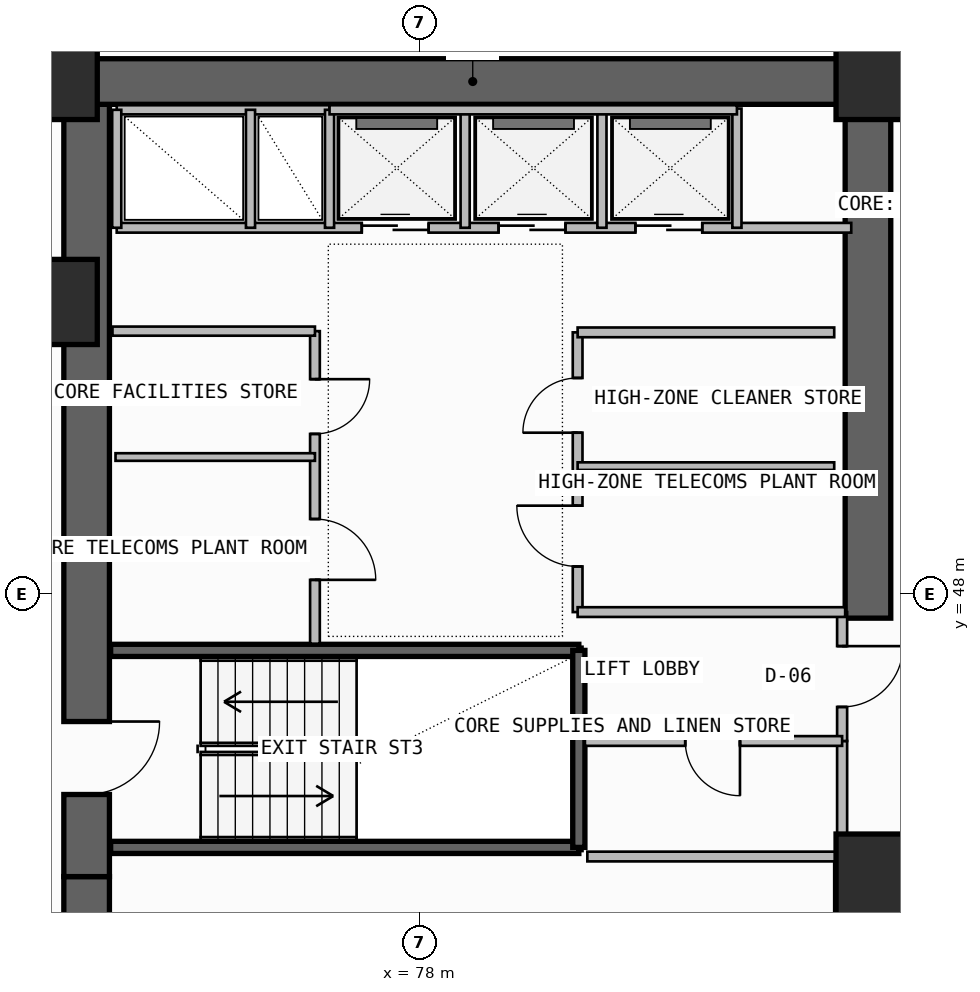
"""IFC4 building model, lengths in metres.
Left out: names, types, materials, properties, quantities, classifications, styles, units other than length and angle.
Written with IfcOpenShell. Run it as: python <this file> out.ifc"""

import sys

from ifc_helpers import new_model, si_unit, direction, frame, frame_2d, origin, origin_2d, place, context, subcontext, project, spatial, rectangle, extrude, element, fill, save


model = new_model("IFC4")
c1 = context("Model", 3, precision=1e-05, world=origin(), true_north=direction((0.0, 1.0)))
c2 = subcontext(c1, "Body", "Model", "MODEL_VIEW")
j1 = project(units=[si_unit("LENGTHUNIT", "METRE"), si_unit("PLANEANGLEUNIT", "RADIAN")], contexts=[c1])
p1 = place(None, origin())
s1 = spatial("IfcSite", under=j1, at=p1, CompositionType="ELEMENT")
p2 = place(p1, origin())
s2 = spatial("IfcBuilding", under=s1, at=p2, CompositionType="ELEMENT")
p3 = place(p2, frame((0.0, 0.0, 222.02)))
s3 = spatial("IfcBuildingStorey", under=s2, at=p3, CompositionType="ELEMENT", Elevation=222.02)
p4 = place(p3, frame((72.525, 35.5, -0.26), z_axis=(0.0, 0.0, 1.0), x_axis=(0.0, 1.0, 0.0)))
e1 = element("IfcWall", 1, at=p4, inside=s3, PredefinedType="SHEAR", context=c2, shape_type="SweptSolid", body=[
    extrude(rectangle(XDim=7.85, YDim=0.75, at=frame_2d((3.925, 0.0))), origin(), (0.0, 0.0, 1.0), 3.52),
])
p5 = place(p4, frame((1.45, 0.0, 0.26)))
e2 = element("IfcOpeningElement", 2, at=p5, cuts=e1, PredefinedType="OPENING", context=c2, shape_type="SweptSolid", body=[
    extrude(rectangle(XDim=1.2, YDim=2.2, at=frame_2d((0.6, 1.1))), frame((0.0, 0.385, 0.0), z_axis=(0.0, -1.0, 0.0), x_axis=(1.0, 0.0, 0.0)), (0.0, 0.0, 1.0), 0.77),
])
p6 = place(p3, frame((72.525, 43.35, -0.26), z_axis=(0.0, 0.0, 1.0), x_axis=(0.0, 1.0, 0.0)))
e3 = element("IfcWall", 3, at=p6, inside=s3, PredefinedType="SHEAR", context=c2, shape_type="SweptSolid", body=[
    extrude(rectangle(XDim=12.7, YDim=0.75, at=frame_2d((6.35, 0.0))), origin(), (0.0, 0.0, 1.0), 3.52),
])
p7 = place(p6, frame((1.35, 0.0, 0.26)))
e4 = element("IfcOpeningElement", 4, at=p7, cuts=e3, PredefinedType="OPENING", context=c2, shape_type="SweptSolid", body=[
    extrude(rectangle(XDim=1.2, YDim=2.2, at=frame_2d((0.6, 1.1))), frame((0.0, 0.385, 0.0), z_axis=(0.0, -1.0, 0.0), x_axis=(1.0, 0.0, 0.0)), (0.0, 0.0, 1.0), 0.77),
])
p8 = place(p3, frame((72.0, 56.425, -0.26), z_axis=(0.0, 0.0, 1.0), x_axis=(1.0, 0.0, 0.0)))
e5 = element("IfcWall", 5, at=p8, inside=s3, PredefinedType="SHEAR", context=c2, shape_type="SweptSolid", body=[
    extrude(rectangle(XDim=13.75, YDim=0.75, at=frame_2d((6.875, 0.0))), origin(), (0.0, 0.0, 1.0), 3.52),
])
p9 = place(p3, frame((85.375, 47.6, -0.26), z_axis=(0.0, 0.0, 1.0), x_axis=(0.0, 1.0, 0.0)))
e6 = element("IfcWall", 6, at=p9, inside=s3, PredefinedType="SHEAR", context=c2, shape_type="SweptSolid", body=[
    extrude(rectangle(XDim=8.45, YDim=0.75, at=frame_2d((4.225, 0.0))), origin(), (0.0, 0.0, 1.0), 3.52),
])
for number, where, z_axis, x_axis in (
    (7, (85.55, 43.35, 0.0), (0.0, 0.0, 1.0), (1.0, 0.0, 0.0)),
    (8, (72.0, 52.8, 0.0), (0.0, 0.0, 1.0), (1.0, 0.0, 0.0)),
    (9, (72.0, 56.5, 0.0), (0.0, 0.0, 1.0), (1.0, 0.0, 0.0)),
    (10, (85.55, 56.5, 0.0), (0.0, 0.0, 1.0), (1.0, 0.0, 0.0)),
):
    element("IfcColumn", number, at=place(p3, frame(where, z_axis=z_axis, x_axis=x_axis)), inside=s3, PredefinedType="COLUMN", context=c2, shape_type="SweptSolid", body=[
        extrude(rectangle(XDim=1.4, YDim=1.4, at=origin_2d()), origin(), (0.0, 0.0, 1.0), 3.52),
    ])
p10 = place(p3, frame((116.396, 56.722, 0.0), z_axis=(0.0, 0.0, 1.0), x_axis=(-0.977936620644, 0.208901809478, 0.0)))
e11 = element("IfcWall", 11, at=p10, inside=s3, PredefinedType="PARAPET", context=c2, shape_type="SweptSolid", body=[
    extrude(rectangle(XDim=31.685, YDim=0.2, at=frame_2d((15.843, 0.0))), origin(), (0.0, 0.0, 1.0), 1.15),
])
p11 = place(p3, frame((84.92, 38.85, 0.0), z_axis=(0.0, 0.0, 1.0), x_axis=(0.0, 1.0, 0.0)))
e12 = element("IfcWall", 12, at=p11, inside=s3, PredefinedType="SOLIDWALL", context=c2, shape_type="SweptSolid", body=[
    extrude(rectangle(XDim=4.83, YDim=0.2, at=frame_2d((2.415, 0.0))), origin(), (0.0, 0.0, 1.0), 3.26),
])
p12 = place(p11, frame((1.25, 0.0, 0.0)))
e13 = element("IfcOpeningElement", 13, at=p12, cuts=e12, PredefinedType="OPENING", context=c2, shape_type="SweptSolid", body=[
    extrude(rectangle(XDim=1.1, YDim=2.2, at=frame_2d((0.55, 1.1))), frame((0.0, 0.11, 0.0), z_axis=(0.0, -1.0, 0.0), x_axis=(1.0, 0.0, 0.0)), (0.0, 0.0, 1.0), 0.22),
])
for number, where, z_axis, x_axis in (
    (14, (72.92, 43.83, -0.26), (0.0, 0.0, 1.0), (1.0, 0.0, 0.0)),
    (15, (72.92, 47.07, -0.26), (0.0, 0.0, 1.0), (1.0, 0.0, 0.0)),
):
    element("IfcWall", number, at=place(p3, frame(where, z_axis=z_axis, x_axis=x_axis)), inside=s3, PredefinedType="SOLIDWALL", context=c2, shape_type="SweptSolid", body=[
        extrude(rectangle(XDim=7.7, YDim=0.2, at=frame_2d((3.85, 0.0))), origin(), (0.0, 0.0, 1.0), 3.52),
    ])
p13 = place(p3, frame((80.62, 43.83, -0.26), z_axis=(0.0, 0.0, 1.0), x_axis=(0.0, 1.0, 0.0)))
e16 = element("IfcWall", 16, at=p13, inside=s3, PredefinedType="SOLIDWALL", context=c2, shape_type="SweptSolid", body=[
    extrude(rectangle(XDim=3.24, YDim=0.2, at=frame_2d((1.62, 0.0))), origin(), (0.0, 0.0, 1.0), 3.52),
])
p14 = place(p3, frame((84.95, 43.68, 0.0), z_axis=(0.0, 0.0, 1.0), x_axis=(0.0, 1.0, 0.0)))
e17 = element("IfcWall", 17, at=p14, inside=s3, PredefinedType="PLUMBINGWALL", context=c2, shape_type="SweptSolid", body=[
    extrude(rectangle(XDim=1.9, YDim=0.165, at=frame_2d((0.95, 0.0))), origin(), (0.0, 0.0, 1.0), 3.26),
])
p15 = place(p3, frame((84.95, 45.58, 0.0), z_axis=(0.0, 0.0, 1.0), x_axis=(0.0, 1.0, 0.0)))
e18 = element("IfcWall", 18, at=p15, inside=s3, PredefinedType="PARTITIONING", context=c2, shape_type="SweptSolid", body=[
    extrude(rectangle(XDim=2.12, YDim=0.165, at=frame_2d((1.06, 0.0))), origin(), (0.0, 0.0, 1.0), 3.26),
])
p16 = place(p15, frame((0.56, 0.0, 0.0)))
e19 = element("IfcOpeningElement", 19, at=p16, cuts=e18, PredefinedType="OPENING", context=c2, shape_type="SweptSolid", body=[
    extrude(rectangle(XDim=1.0, YDim=2.2, at=frame_2d((0.5, 1.1))), frame((0.0, 0.093, 0.0), z_axis=(0.0, -1.0, 0.0), x_axis=(1.0, 0.0, 0.0)), (0.0, 0.0, 1.0), 0.185),
])
p17 = place(p3, frame((80.72, 45.58, 0.0), z_axis=(0.0, 0.0, 1.0), x_axis=(1.0, 0.0, 0.0)))
e20 = element("IfcWall", 20, at=p17, inside=s3, PredefinedType="PLUMBINGWALL", context=c2, shape_type="SweptSolid", body=[
    extrude(rectangle(XDim=4.23, YDim=0.16, at=frame_2d((2.115, 0.0))), origin(), (0.0, 0.0, 1.0), 3.26),
])
p18 = place(p17, frame((1.65, 0.0, 0.0)))
e21 = element("IfcOpeningElement", 21, at=p18, cuts=e20, PredefinedType="OPENING", context=c2, shape_type="SweptSolid", body=[
    extrude(rectangle(XDim=0.9, YDim=2.1, at=frame_2d((0.45, 1.05))), frame((0.0, 0.09, 0.0), z_axis=(0.0, -1.0, 0.0), x_axis=(1.0, 0.0, 0.0)), (0.0, 0.0, 1.0), 0.18),
])
p19 = place(p3, frame((80.76, 43.68, 0.0), z_axis=(0.0, 0.0, 1.0), x_axis=(1.0, 0.0, 0.0)))
e22 = element("IfcWall", 22, at=p19, inside=s3, PredefinedType="PLUMBINGWALL", context=c2, shape_type="SweptSolid", body=[
    extrude(rectangle(XDim=4.19, YDim=0.16, at=frame_2d((2.095, 0.0))), origin(), (0.0, 0.0, 1.0), 3.26),
])
p20 = place(p3, frame((76.28, 47.18, 0.0), z_axis=(0.0, 0.0, 1.0), x_axis=(0.0, 1.0, 0.0)))
e23 = element("IfcWall", 23, at=p20, inside=s3, PredefinedType="SOLIDWALL", context=c2, shape_type="SweptSolid", body=[
    extrude(rectangle(XDim=5.14, YDim=0.16, at=frame_2d((2.57, 0.0))), origin(), (0.0, 0.0, 1.0), 3.26),
])
p21 = place(p20, frame((1.05, 0.0, 0.0)))
e24 = element("IfcOpeningElement", 24, at=p21, cuts=e23, PredefinedType="OPENING", context=c2, shape_type="SweptSolid", body=[
    extrude(rectangle(XDim=1.0, YDim=2.2, at=frame_2d((0.5, 1.1))), frame((0.0, 0.09, 0.0), z_axis=(0.0, -1.0, 0.0), x_axis=(1.0, 0.0, 0.0)), (0.0, 0.0, 1.0), 0.18),
])
p22 = place(p20, frame((3.45, 0.0, 0.0)))
e25 = element("IfcOpeningElement", 25, at=p22, cuts=e23, PredefinedType="OPENING", context=c2, shape_type="SweptSolid", body=[
    extrude(rectangle(XDim=0.9, YDim=2.1, at=frame_2d((0.45, 1.05))), frame((0.0, 0.09, 0.0), z_axis=(0.0, -1.0, 0.0), x_axis=(1.0, 0.0, 0.0)), (0.0, 0.0, 1.0), 0.18),
])
p23 = place(p3, frame((72.95, 52.32, 0.0), z_axis=(0.0, 0.0, 1.0), x_axis=(1.0, 0.0, 0.0)))
e26 = element("IfcWall", 26, at=p23, inside=s3, PredefinedType="SOLIDWALL", context=c2, shape_type="SweptSolid", body=[
    extrude(rectangle(XDim=3.33, YDim=0.15, at=frame_2d((1.665, 0.0))), origin(), (0.0, 0.0, 1.0), 3.26),
])
p24 = place(p3, frame((73.0, 50.25, 0.0), z_axis=(0.0, 0.0, 1.0), x_axis=(1.0, 0.0, 0.0)))
e27 = element("IfcWall", 27, at=p24, inside=s3, PredefinedType="PARTITIONING", context=c2, shape_type="SweptSolid", body=[
    extrude(rectangle(XDim=3.28, YDim=0.125, at=frame_2d((1.64, 0.0))), origin(), (0.0, 0.0, 1.0), 3.26),
])
p25 = place(p3, frame((80.6, 47.7, 0.0), z_axis=(0.0, 0.0, 1.0), x_axis=(0.0, 1.0, 0.0)))
e28 = element("IfcWall", 28, at=p25, inside=s3, PredefinedType="SOLIDWALL", context=c2, shape_type="SweptSolid", body=[
    extrude(rectangle(XDim=4.6, YDim=0.16, at=frame_2d((2.3, 0.0))), origin(), (0.0, 0.0, 1.0), 3.26),
])
p26 = place(p25, frame((0.75, 0.0, 0.0)))
e29 = element("IfcOpeningElement", 29, at=p26, cuts=e28, PredefinedType="OPENING", context=c2, shape_type="SweptSolid", body=[
    extrude(rectangle(XDim=1.0, YDim=2.2, at=frame_2d((0.5, 1.1))), frame((0.0, 0.09, 0.0), z_axis=(0.0, -1.0, 0.0), x_axis=(1.0, 0.0, 0.0)), (0.0, 0.0, 1.0), 0.18),
])
p27 = place(p25, frame((2.95, 0.0, 0.0)))
e30 = element("IfcOpeningElement", 30, at=p27, cuts=e28, PredefinedType="OPENING", context=c2, shape_type="SweptSolid", body=[
    extrude(rectangle(XDim=0.9, YDim=2.1, at=frame_2d((0.45, 1.05))), frame((0.0, 0.09, 0.0), z_axis=(0.0, -1.0, 0.0), x_axis=(1.0, 0.0, 0.0)), (0.0, 0.0, 1.0), 0.18),
])
p28 = place(p3, frame((80.6, 47.7, 0.0), z_axis=(0.0, 0.0, 1.0), x_axis=(1.0, 0.0, 0.0)))
e31 = element("IfcWall", 31, at=p28, inside=s3, PredefinedType="SOLIDWALL", context=c2, shape_type="SweptSolid", body=[
    extrude(rectangle(XDim=4.4, YDim=0.16, at=frame_2d((2.2, 0.0))), origin(), (0.0, 0.0, 1.0), 3.26),
])
p29 = place(p3, frame((80.6, 52.3, 0.0), z_axis=(0.0, 0.0, 1.0), x_axis=(1.0, 0.0, 0.0)))
e32 = element("IfcWall", 32, at=p29, inside=s3, PredefinedType="SOLIDWALL", context=c2, shape_type="SweptSolid", body=[
    extrude(rectangle(XDim=4.22, YDim=0.16, at=frame_2d((2.11, 0.0))), origin(), (0.0, 0.0, 1.0), 3.26),
])
p30 = place(p3, frame((80.6, 50.1, 0.0), z_axis=(0.0, 0.0, 1.0), x_axis=(1.0, 0.0, 0.0)))
e33 = element("IfcWall", 33, at=p30, inside=s3, PredefinedType="PARTITIONING", context=c2, shape_type="SweptSolid", body=[
    extrude(rectangle(XDim=4.22, YDim=0.125, at=frame_2d((2.11, 0.0))), origin(), (0.0, 0.0, 1.0), 3.26),
])
p31 = place(p3, frame((73.02, 54.02, 0.0), z_axis=(0.0, 0.0, 1.0), x_axis=(1.0, 0.0, 0.0)))
e34 = element("IfcWall", 34, at=p31, inside=s3, PredefinedType="SOLIDWALL", context=c2, shape_type="SweptSolid", body=[
    extrude(rectangle(XDim=12.08, YDim=0.16, at=frame_2d((6.04, 0.0))), origin(), (0.0, 0.0, 1.0), 3.26),
])
p32 = place(p31, frame((4.03, 0.0, 0.0)))
e35 = element("IfcOpeningElement", 35, at=p32, cuts=e34, PredefinedType="OPENING", context=c2, shape_type="SweptSolid", body=[
    extrude(rectangle(XDim=1.1, YDim=2.25, at=frame_2d((0.55, 1.125))), frame((0.0, 0.09, 0.0), z_axis=(0.0, -1.0, 0.0), x_axis=(1.0, 0.0, 0.0)), (0.0, 0.0, 1.0), 0.18),
])
p33 = place(p31, frame((6.28, 0.0, 0.0)))
e36 = element("IfcOpeningElement", 36, at=p33, cuts=e34, PredefinedType="OPENING", context=c2, shape_type="SweptSolid", body=[
    extrude(rectangle(XDim=1.1, YDim=2.25, at=frame_2d((0.55, 1.125))), frame((0.0, 0.09, 0.0), z_axis=(0.0, -1.0, 0.0), x_axis=(1.0, 0.0, 0.0)), (0.0, 0.0, 1.0), 0.18),
])
p34 = place(p31, frame((8.53, 0.0, 0.0)))
e37 = element("IfcOpeningElement", 37, at=p34, cuts=e34, PredefinedType="OPENING", context=c2, shape_type="SweptSolid", body=[
    extrude(rectangle(XDim=1.1, YDim=2.25, at=frame_2d((0.55, 1.125))), frame((0.0, 0.09, 0.0), z_axis=(0.0, -1.0, 0.0), x_axis=(1.0, 0.0, 0.0)), (0.0, 0.0, 1.0), 0.18),
])
p35 = place(p3, frame((73.02, 55.96, 0.0), z_axis=(0.0, 0.0, 1.0), x_axis=(1.0, 0.0, 0.0)))
e38 = element("IfcWall", 38, at=p35, inside=s3, PredefinedType="SOLIDWALL", context=c2, shape_type="SweptSolid", body=[
    extrude(rectangle(XDim=3.5, YDim=0.15, at=frame_2d((1.75, 0.0))), origin(), (0.0, 0.0, 1.0), 3.26),
])
p36 = place(p3, frame((73.02, 54.02, 0.0), z_axis=(0.0, 0.0, 1.0), x_axis=(0.0, 1.0, 0.0)))
e39 = element("IfcWall", 39, at=p36, inside=s3, PredefinedType="PLUMBINGWALL", context=c2, shape_type="SweptSolid", body=[
    extrude(rectangle(XDim=1.94, YDim=0.15, at=frame_2d((0.97, 0.0))), origin(), (0.0, 0.0, 1.0), 3.26),
])
p37 = place(p3, frame((76.52, 54.02, 0.0), z_axis=(0.0, 0.0, 1.0), x_axis=(0.0, 1.0, 0.0)))
e40 = element("IfcWall", 40, at=p37, inside=s3, PredefinedType="SOLIDWALL", context=c2, shape_type="SweptSolid", body=[
    extrude(rectangle(XDim=1.94, YDim=0.15, at=frame_2d((0.97, 0.0))), origin(), (0.0, 0.0, 1.0), 3.26),
])
p38 = place(p3, frame((75.22, 54.02, 0.0), z_axis=(0.0, 0.0, 1.0), x_axis=(0.0, 1.0, 0.0)))
e41 = element("IfcWall", 41, at=p38, inside=s3, PredefinedType="PLUMBINGWALL", context=c2, shape_type="SweptSolid", body=[
    extrude(rectangle(XDim=1.94, YDim=0.15, at=frame_2d((0.97, 0.0))), origin(), (0.0, 0.0, 1.0), 3.26),
])
for number, where, z_axis, x_axis in (
    (42, (78.75, 54.02, 0.0), (0.0, 0.0, 1.0), (0.0, 1.0, 0.0)),
    (43, (81.0, 54.02, 0.0), (0.0, 0.0, 1.0), (0.0, 1.0, 0.0)),
):
    element("IfcWall", number, at=place(p3, frame(where, z_axis=z_axis, x_axis=x_axis)), inside=s3, PredefinedType="PLUMBINGWALL", context=c2, shape_type="SweptSolid", body=[
        extrude(rectangle(XDim=1.96, YDim=0.15, at=frame_2d((0.98, 0.0))), origin(), (0.0, 0.0, 1.0), 3.26),
    ])
p39 = place(p3, frame((83.22, 54.02, 0.0), z_axis=(0.0, 0.0, 1.0), x_axis=(0.0, 1.0, 0.0)))
e44 = element("IfcWall", 44, at=p39, inside=s3, PredefinedType="SOLIDWALL", context=c2, shape_type="SweptSolid", body=[
    extrude(rectangle(XDim=1.96, YDim=0.15, at=frame_2d((0.98, 0.0))), origin(), (0.0, 0.0, 1.0), 3.26),
])
p40 = place(p3, frame((76.52, 55.96, 0.0), z_axis=(0.0, 0.0, 1.0), x_axis=(1.0, 0.0, 0.0)))
e45 = element("IfcWall", 45, at=p40, inside=s3, PredefinedType="SOLIDWALL", context=c2, shape_type="SweptSolid", body=[
    extrude(rectangle(XDim=6.7, YDim=0.15, at=frame_2d((3.35, 0.0))), origin(), (0.0, 0.0, 1.0), 3.26),
])
p41 = place(p7, frame((1.2, 0.0, 0.0), z_axis=(0.0, 0.0, 1.0), x_axis=(-1.0, 0.0, 0.0)))
e46 = element("IfcDoor", 46, at=p41, inside=s3, OperationType="SINGLE_SWING_LEFT", PredefinedType="USERDEFINED", context=c2, shape_type="SweptSolid", body=[
    extrude(rectangle(XDim=1.2, YDim=2.2, at=frame_2d((0.6, 1.1))), frame((0.0, 0.025, 0.0), z_axis=(0.0, -1.0, 0.0), x_axis=(1.0, 0.0, 0.0)), (0.0, 0.0, 1.0), 0.05),
])
fill(e4, e46)
p42 = place(p16, frame((1.0, 0.0, 0.0), z_axis=(0.0, 0.0, 1.0), x_axis=(-1.0, 0.0, 0.0)))
e47 = element("IfcDoor", 47, at=p42, inside=s3, OperationType="SINGLE_SWING_LEFT", PredefinedType="DOOR", context=c2, shape_type="SweptSolid", body=[
    extrude(rectangle(XDim=1.0, YDim=2.2, at=frame_2d((0.5, 1.1))), frame((0.0, 0.025, 0.0), z_axis=(0.0, -1.0, 0.0), x_axis=(1.0, 0.0, 0.0)), (0.0, 0.0, 1.0), 0.05),
])
fill(e19, e47)
p43 = place(p18, frame((0.9, 0.0, 0.0), z_axis=(0.0, 0.0, 1.0), x_axis=(-1.0, 0.0, 0.0)))
e48 = element("IfcDoor", 48, at=p43, inside=s3, OperationType="SINGLE_SWING_LEFT", PredefinedType="DOOR", context=c2, shape_type="SweptSolid", body=[
    extrude(rectangle(XDim=0.9, YDim=2.1, at=frame_2d((0.45, 1.05))), frame((0.0, 0.025, 0.0), z_axis=(0.0, -1.0, 0.0), x_axis=(1.0, 0.0, 0.0)), (0.0, 0.0, 1.0), 0.05),
])
fill(e21, e48)
p44 = place(p21, frame((1.0, 0.0, 0.0), z_axis=(0.0, 0.0, 1.0), x_axis=(-1.0, 0.0, 0.0)))
e49 = element("IfcDoor", 49, at=p44, inside=s3, OperationType="SINGLE_SWING_RIGHT", PredefinedType="DOOR", context=c2, shape_type="SweptSolid", body=[
    extrude(rectangle(XDim=1.0, YDim=2.2, at=frame_2d((0.5, 1.1))), frame((0.0, 0.025, 0.0), z_axis=(0.0, -1.0, 0.0), x_axis=(1.0, 0.0, 0.0)), (0.0, 0.0, 1.0), 0.05),
])
fill(e24, e49)
p45 = place(p22, frame((0.9, 0.0, 0.0), z_axis=(0.0, 0.0, 1.0), x_axis=(-1.0, 0.0, 0.0)))
e50 = element("IfcDoor", 50, at=p45, inside=s3, OperationType="SINGLE_SWING_LEFT", PredefinedType="DOOR", context=c2, shape_type="SweptSolid", body=[
    extrude(rectangle(XDim=0.9, YDim=2.1, at=frame_2d((0.45, 1.05))), frame((0.0, 0.025, 0.0), z_axis=(0.0, -1.0, 0.0), x_axis=(1.0, 0.0, 0.0)), (0.0, 0.0, 1.0), 0.05),
])
fill(e25, e50)
p46 = place(p26, origin())
e51 = element("IfcDoor", 51, at=p46, inside=s3, OperationType="SINGLE_SWING_RIGHT", PredefinedType="DOOR", context=c2, shape_type="SweptSolid", body=[
    extrude(rectangle(XDim=1.0, YDim=2.2, at=frame_2d((0.5, 1.1))), frame((0.0, 0.025, 0.0), z_axis=(0.0, -1.0, 0.0), x_axis=(1.0, 0.0, 0.0)), (0.0, 0.0, 1.0), 0.05),
])
fill(e29, e51)
p47 = place(p27, origin())
e52 = element("IfcDoor", 52, at=p47, inside=s3, OperationType="SINGLE_SWING_LEFT", PredefinedType="DOOR", context=c2, shape_type="SweptSolid", body=[
    extrude(rectangle(XDim=0.9, YDim=2.1, at=frame_2d((0.45, 1.05))), frame((0.0, 0.025, 0.0), z_axis=(0.0, -1.0, 0.0), x_axis=(1.0, 0.0, 0.0)), (0.0, 0.0, 1.0), 0.05),
])
fill(e30, e52)
p48 = place(p32, origin())
e53 = element("IfcDoor", 53, at=p48, inside=s3, OperationType="DOUBLE_DOOR_SLIDING", PredefinedType="DOOR", context=c2, shape_type="SweptSolid", body=[
    extrude(rectangle(XDim=1.1, YDim=2.25, at=frame_2d((0.55, 1.125))), frame((0.0, 0.025, 0.0), z_axis=(0.0, -1.0, 0.0), x_axis=(1.0, 0.0, 0.0)), (0.0, 0.0, 1.0), 0.05),
])
fill(e35, e53)
p49 = place(p33, origin())
e54 = element("IfcDoor", 54, at=p49, inside=s3, OperationType="DOUBLE_DOOR_SLIDING", PredefinedType="DOOR", context=c2, shape_type="SweptSolid", body=[
    extrude(rectangle(XDim=1.1, YDim=2.25, at=frame_2d((0.55, 1.125))), frame((0.0, 0.025, 0.0), z_axis=(0.0, -1.0, 0.0), x_axis=(1.0, 0.0, 0.0)), (0.0, 0.0, 1.0), 0.05),
])
fill(e36, e54)
p50 = place(p34, origin())
e55 = element("IfcDoor", 55, at=p50, inside=s3, OperationType="DOUBLE_DOOR_SLIDING", PredefinedType="DOOR", context=c2, shape_type="SweptSolid", body=[
    extrude(rectangle(XDim=1.1, YDim=2.25, at=frame_2d((0.55, 1.125))), frame((0.0, 0.025, 0.0), z_axis=(0.0, -1.0, 0.0), x_axis=(1.0, 0.0, 0.0)), (0.0, 0.0, 1.0), 0.05),
])
fill(e37, e55)
save(model, sys.argv[1])
